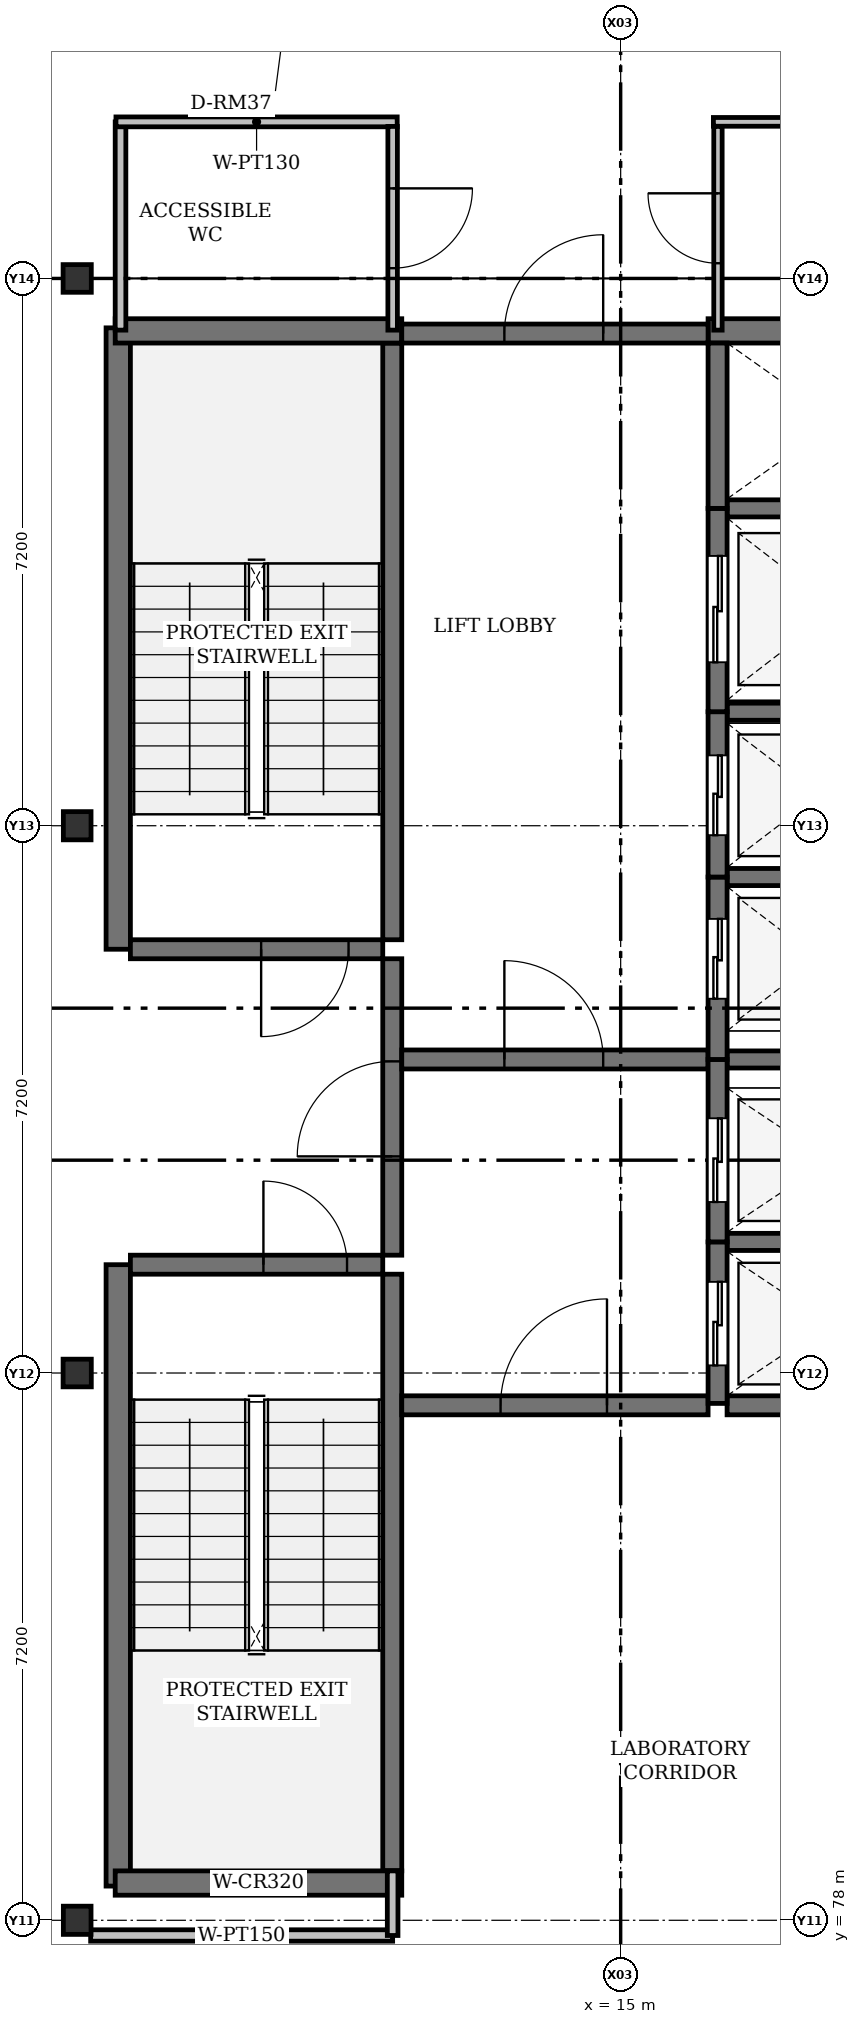
"""IFC4 building model, lengths in metres.
Left out: names, types, materials, properties, quantities, classifications, styles, units other than length and angle.
Written with IfcOpenShell. Run it as: python <this file> out.ifc"""

import sys

from ifc_helpers import new_model, si_unit, direction, frame, frame_2d, origin, origin_2d, place, context, subcontext, project, spatial, rectangle, i_section, extrude, element, fill, save


model = new_model("IFC4")
c1 = context("Model", 3, precision=1e-05, world=origin(), true_north=direction((0.0, 1.0)))
c2 = subcontext(c1, "Body", "Model", "MODEL_VIEW")
j1 = project(units=[si_unit("LENGTHUNIT", "METRE"), si_unit("PLANEANGLEUNIT", "RADIAN")], contexts=[c1])
p1 = place(None, origin())
s1 = spatial("IfcSite", under=j1, at=p1, CompositionType="ELEMENT")
p2 = place(p1, origin())
s2 = spatial("IfcBuilding", under=s1, at=p2, CompositionType="ELEMENT")
p3 = place(p2, frame((0.0, 0.0, 35.1)))
s3 = spatial("IfcBuildingStorey", under=s2, at=p3, CompositionType="ELEMENT", Elevation=35.1)
for number, where, z_axis, x_axis in (
    (1, (7.85, 78.0, 0.0), (0.0, 0.0, 1.0), (0.0, 1.0, 0.0)),
    (2, (7.85, 85.2, 0.0), (0.0, 0.0, 1.0), (1.0, 0.0, 0.0)),
    (3, (7.85, 92.4, 0.0), (0.0, 0.0, 1.0), (0.0, 1.0, 0.0)),
    (4, (7.85, 99.6, 0.0), (0.0, 0.0, 1.0), (1.0, 0.0, 0.0)),
):
    element("IfcColumn", number, at=place(p3, frame(where, z_axis=z_axis, x_axis=x_axis)), inside=s3, PredefinedType="COLUMN", context=c2, shape_type="SweptSolid", body=[
        extrude(i_section(OverallWidth=0.371, OverallDepth=0.364, WebThickness=0.013, FlangeThickness=0.022, FilletRadius=0.015, at=origin_2d()), origin(), (0.0, 0.0, 1.0), 4.2),
    ])
for number, where, z_axis, x_axis in (
    (5, (8.39, 78.45, 0.0), (0.0, 0.0, 1.0), (0.0, 1.0, 0.0)),
    (6, (8.39, 90.775, 0.0), (0.0, 0.0, 1.0), (0.0, 1.0, 0.0)),
):
    element("IfcWall", number, at=place(p3, frame(where, z_axis=z_axis, x_axis=x_axis)), inside=s3, PredefinedType="SHEAR", context=c2, shape_type="SweptSolid", body=[
        extrude(rectangle(XDim=8.175, YDim=0.32, at=frame_2d((4.087, 0.0))), origin(), (0.0, 0.0, 1.0), 4.2),
    ])
for number, where, z_axis, x_axis in (
    (7, (11.995, 78.65, 0.0), (0.0, 0.0, 1.0), (0.0, 1.0, 0.0)),
    (8, (11.995, 90.9, 0.0), (0.0, 0.0, 1.0), (0.0, 1.0, 0.0)),
):
    element("IfcWall", number, at=place(p3, frame(where, z_axis=z_axis, x_axis=x_axis)), inside=s3, PredefinedType="SHEAR", context=c2, shape_type="SweptSolid", body=[
        extrude(rectangle(XDim=7.85, YDim=0.25, at=frame_2d((3.925, 0.0))), origin(), (0.0, 0.0, 1.0), 4.2),
    ])
p4 = place(p3, frame((11.995, 86.75, 0.0), z_axis=(0.0, 0.0, 1.0), x_axis=(0.0, 1.0, 0.0)))
e9 = element("IfcWall", 9, at=p4, inside=s3, PredefinedType="SHEAR", context=c2, shape_type="SweptSolid", body=[
    extrude(rectangle(XDim=3.9, YDim=0.25, at=frame_2d((1.95, 0.0))), origin(), (0.0, 0.0, 1.0), 4.2),
])
p5 = place(p4, frame((1.3, 0.0, 0.0)))
e10 = element("IfcOpeningElement", 10, at=p5, cuts=e9, PredefinedType="OPENING", context=c2, shape_type="SweptSolid", body=[
    extrude(rectangle(XDim=1.25, YDim=2.2, at=frame_2d((0.625, 1.1))), frame((0.0, 0.125, 0.0), z_axis=(0.0, -1.0, 0.0), x_axis=(1.0, 0.0, 0.0)), (0.0, 0.0, 1.0), 0.25),
])
for number, where, z_axis, x_axis in (
    (11, (8.35, 78.49, 0.0), (0.0, 0.0, 1.0), (1.0, 0.0, 0.0)),
    (12, (8.35, 98.91, 0.0), (0.0, 0.0, 1.0), (1.0, 0.0, 0.0)),
):
    element("IfcWall", number, at=place(p3, frame(where, z_axis=z_axis, x_axis=x_axis)), inside=s3, PredefinedType="SHEAR", context=c2, shape_type="SweptSolid", body=[
        extrude(rectangle(XDim=3.77, YDim=0.32, at=frame_2d((1.885, 0.0))), origin(), (0.0, 0.0, 1.0), 4.2),
    ])
p6 = place(p3, frame((16.15, 98.91, 0.0), z_axis=(0.0, 0.0, 1.0), x_axis=(1.0, 0.0, 0.0)))
e13 = element("IfcWall", 13, at=p6, inside=s3, PredefinedType="SHEAR", context=c2, shape_type="SweptSolid", body=[
    extrude(rectangle(XDim=3.3, YDim=0.32, at=frame_2d((1.65, 0.0))), origin(), (0.0, 0.0, 1.0), 4.2),
])
p7 = place(p3, frame((12.12, 98.875, 0.0), z_axis=(0.0, 0.0, 1.0), x_axis=(1.0, 0.0, 0.0)))
e14 = element("IfcWall", 14, at=p7, inside=s3, PredefinedType="SHEAR", context=c2, shape_type="SweptSolid", body=[
    extrude(rectangle(XDim=4.03, YDim=0.25, at=frame_2d((2.015, 0.0))), origin(), (0.0, 0.0, 1.0), 4.2),
])
p8 = place(p7, frame((1.35, 0.0, 0.0)))
e15 = element("IfcOpeningElement", 15, at=p8, cuts=e14, PredefinedType="OPENING", context=c2, shape_type="SweptSolid", body=[
    extrude(rectangle(XDim=1.3, YDim=2.2, at=frame_2d((0.65, 1.1))), frame((0.0, 0.125, 0.0), z_axis=(0.0, -1.0, 0.0), x_axis=(1.0, 0.0, 0.0)), (0.0, 0.0, 1.0), 0.25),
])
p9 = place(p3, frame((8.55, 86.625, 0.0), z_axis=(0.0, 0.0, 1.0), x_axis=(1.0, 0.0, 0.0)))
e16 = element("IfcWall", 16, at=p9, inside=s3, PredefinedType="SHEAR", context=c2, shape_type="SweptSolid", body=[
    extrude(rectangle(XDim=3.32, YDim=0.25, at=frame_2d((1.66, 0.0))), origin(), (0.0, 0.0, 1.0), 4.2),
])
p10 = place(p9, frame((1.75, 0.0, 0.0)))
e17 = element("IfcOpeningElement", 17, at=p10, cuts=e16, PredefinedType="OPENING", context=c2, shape_type="SweptSolid", body=[
    extrude(rectangle(XDim=1.1, YDim=2.15, at=frame_2d((0.55, 1.075))), frame((0.0, 0.125, 0.0), z_axis=(0.0, -1.0, 0.0), x_axis=(1.0, 0.0, 0.0)), (0.0, 0.0, 1.0), 0.25),
])
p11 = place(p3, frame((11.87, 90.775, 0.0), z_axis=(0.0, 0.0, 1.0), x_axis=(-1.0, 0.0, 0.0)))
e18 = element("IfcWall", 18, at=p11, inside=s3, PredefinedType="SHEAR", context=c2, shape_type="SweptSolid", body=[
    extrude(rectangle(XDim=3.32, YDim=0.25, at=frame_2d((1.66, 0.0))), origin(), (0.0, 0.0, 1.0), 4.2),
])
p12 = place(p11, frame((0.45, 0.0, 0.0)))
e19 = element("IfcOpeningElement", 19, at=p12, cuts=e18, PredefinedType="OPENING", context=c2, shape_type="SweptSolid", body=[
    extrude(rectangle(XDim=1.15, YDim=2.15, at=frame_2d((0.575, 1.075))), frame((0.0, 0.125, 0.0), z_axis=(0.0, -1.0, 0.0), x_axis=(1.0, 0.0, 0.0)), (0.0, 0.0, 1.0), 0.25),
])
p13 = place(p3, frame((12.12, 89.325, 0.0), z_axis=(0.0, 0.0, 1.0), x_axis=(1.0, 0.0, 0.0)))
e20 = element("IfcWall", 20, at=p13, inside=s3, PredefinedType="SHEAR", context=c2, shape_type="SweptSolid", body=[
    extrude(rectangle(XDim=4.03, YDim=0.25, at=frame_2d((2.015, 0.0))), origin(), (0.0, 0.0, 1.0), 4.2),
])
p14 = place(p13, frame((1.35, 0.0, 0.0)))
e21 = element("IfcOpeningElement", 21, at=p14, cuts=e20, PredefinedType="OPENING", context=c2, shape_type="SweptSolid", body=[
    extrude(rectangle(XDim=1.3, YDim=2.2, at=frame_2d((0.65, 1.1))), frame((0.0, 0.125, 0.0), z_axis=(0.0, -1.0, 0.0), x_axis=(1.0, 0.0, 0.0)), (0.0, 0.0, 1.0), 0.25),
])
p15 = place(p3, frame((12.12, 84.775, 0.0), z_axis=(0.0, 0.0, 1.0), x_axis=(1.0, 0.0, 0.0)))
e22 = element("IfcWall", 22, at=p15, inside=s3, PredefinedType="SHEAR", context=c2, shape_type="SweptSolid", body=[
    extrude(rectangle(XDim=4.03, YDim=0.25, at=frame_2d((2.015, 0.0))), origin(), (0.0, 0.0, 1.0), 4.2),
])
p16 = place(p15, frame((1.3, 0.0, 0.0)))
e23 = element("IfcOpeningElement", 23, at=p16, cuts=e22, PredefinedType="OPENING", context=c2, shape_type="SweptSolid", body=[
    extrude(rectangle(XDim=1.4, YDim=2.25, at=frame_2d((0.7, 1.125))), frame((0.0, 0.125, 0.0), z_axis=(0.0, -1.0, 0.0), x_axis=(1.0, 0.0, 0.0)), (0.0, 0.0, 1.0), 0.25),
])
p17 = place(p3, frame((16.4, 84.775, 0.0), z_axis=(0.0, 0.0, 1.0), x_axis=(1.0, 0.0, 0.0)))
e24 = element("IfcWall", 24, at=p17, inside=s3, PredefinedType="SHEAR", context=c2, shape_type="SweptSolid", body=[
    extrude(rectangle(XDim=2.95, YDim=0.25, at=frame_2d((1.475, 0.0))), origin(), (0.0, 0.0, 1.0), 4.2),
])
for number, where, z_axis, x_axis in (
    (25, (16.4, 86.925, 0.0), (0.0, 0.0, 1.0), (1.0, 0.0, 0.0)),
    (26, (16.4, 89.325, 0.0), (0.0, 0.0, 1.0), (1.0, 0.0, 0.0)),
    (27, (16.4, 91.725, 0.0), (0.0, 0.0, 1.0), (1.0, 0.0, 0.0)),
    (28, (16.4, 93.9, 0.0), (0.0, 0.0, 1.0), (1.0, 0.0, 0.0)),
    (29, (16.4, 96.575, 0.0), (0.0, 0.0, 1.0), (1.0, 0.0, 0.0)),
):
    element("IfcWall", number, at=place(p3, frame(where, z_axis=z_axis, x_axis=x_axis)), inside=s3, PredefinedType="SHEAR", context=c2, shape_type="SweptSolid", body=[
        extrude(rectangle(XDim=2.8, YDim=0.225, at=frame_2d((1.4, 0.0))), origin(), (0.0, 0.0, 1.0), 4.2),
    ])
p18 = place(p3, frame((16.275, 84.8, 0.0), z_axis=(0.0, 0.0, 1.0), x_axis=(0.0, 1.0, 0.0)))
e30 = element("IfcWall", 30, at=p18, inside=s3, PredefinedType="SHEAR", context=c2, shape_type="SweptSolid", body=[
    extrude(rectangle(XDim=2.125, YDim=0.25, at=frame_2d((1.062, 0.0))), origin(), (0.0, 0.0, 1.0), 4.2),
])
p19 = place(p18, frame((0.5, 0.0, 0.0)))
e31 = element("IfcOpeningElement", 31, at=p19, cuts=e30, PredefinedType="OPENING", context=c2, shape_type="SweptSolid", body=[
    extrude(rectangle(XDim=1.1, YDim=2.15, at=frame_2d((0.55, 1.075))), frame((0.0, 0.125, 0.0), z_axis=(0.0, -1.0, 0.0), x_axis=(1.0, 0.0, 0.0)), (0.0, 0.0, 1.0), 0.25),
])
p20 = place(p3, frame((16.275, 86.925, 0.0), z_axis=(0.0, 0.0, 1.0), x_axis=(0.0, 1.0, 0.0)))
e32 = element("IfcWall", 32, at=p20, inside=s3, PredefinedType="SHEAR", context=c2, shape_type="SweptSolid", body=[
    extrude(rectangle(XDim=2.4, YDim=0.25, at=frame_2d((1.2, 0.0))), origin(), (0.0, 0.0, 1.0), 4.2),
])
p21 = place(p20, frame((0.525, 0.0, 0.0)))
e33 = element("IfcOpeningElement", 33, at=p21, cuts=e32, PredefinedType="OPENING", context=c2, shape_type="SweptSolid", body=[
    extrude(rectangle(XDim=1.1, YDim=2.15, at=frame_2d((0.55, 1.075))), frame((0.0, 0.125, 0.0), z_axis=(0.0, -1.0, 0.0), x_axis=(1.0, 0.0, 0.0)), (0.0, 0.0, 1.0), 0.25),
])
p22 = place(p3, frame((16.275, 89.325, 0.0), z_axis=(0.0, 0.0, 1.0), x_axis=(0.0, 1.0, 0.0)))
e34 = element("IfcWall", 34, at=p22, inside=s3, PredefinedType="SHEAR", context=c2, shape_type="SweptSolid", body=[
    extrude(rectangle(XDim=2.4, YDim=0.25, at=frame_2d((1.2, 0.0))), origin(), (0.0, 0.0, 1.0), 4.2),
])
p23 = place(p22, frame((0.8, 0.0, 0.0)))
e35 = element("IfcOpeningElement", 35, at=p23, cuts=e34, PredefinedType="OPENING", context=c2, shape_type="SweptSolid", body=[
    extrude(rectangle(XDim=1.05, YDim=2.15, at=frame_2d((0.525, 1.075))), frame((0.0, 0.125, 0.0), z_axis=(0.0, -1.0, 0.0), x_axis=(1.0, 0.0, 0.0)), (0.0, 0.0, 1.0), 0.25),
])
p24 = place(p3, frame((16.275, 91.725, 0.0), z_axis=(0.0, 0.0, 1.0), x_axis=(0.0, 1.0, 0.0)))
e36 = element("IfcWall", 36, at=p24, inside=s3, PredefinedType="SHEAR", context=c2, shape_type="SweptSolid", body=[
    extrude(rectangle(XDim=2.175, YDim=0.25, at=frame_2d((1.087, 0.0))), origin(), (0.0, 0.0, 1.0), 4.2),
])
p25 = place(p24, frame((0.55, 0.0, 0.0)))
e37 = element("IfcOpeningElement", 37, at=p25, cuts=e36, PredefinedType="OPENING", context=c2, shape_type="SweptSolid", body=[
    extrude(rectangle(XDim=1.05, YDim=2.15, at=frame_2d((0.525, 1.075))), frame((0.0, 0.125, 0.0), z_axis=(0.0, -1.0, 0.0), x_axis=(1.0, 0.0, 0.0)), (0.0, 0.0, 1.0), 0.25),
])
p26 = place(p3, frame((16.275, 93.9, 0.0), z_axis=(0.0, 0.0, 1.0), x_axis=(0.0, 1.0, 0.0)))
e38 = element("IfcWall", 38, at=p26, inside=s3, PredefinedType="SHEAR", context=c2, shape_type="SweptSolid", body=[
    extrude(rectangle(XDim=2.675, YDim=0.25, at=frame_2d((1.337, 0.0))), origin(), (0.0, 0.0, 1.0), 4.2),
])
p27 = place(p26, frame((0.65, 0.0, 0.0)))
e39 = element("IfcOpeningElement", 39, at=p27, cuts=e38, PredefinedType="OPENING", context=c2, shape_type="SweptSolid", body=[
    extrude(rectangle(XDim=1.4, YDim=2.25, at=frame_2d((0.7, 1.125))), frame((0.0, 0.125, 0.0), z_axis=(0.0, -1.0, 0.0), x_axis=(1.0, 0.0, 0.0)), (0.0, 0.0, 1.0), 0.25),
])
p28 = place(p3, frame((16.275, 96.575, 0.0), z_axis=(0.0, 0.0, 1.0), x_axis=(0.0, 1.0, 0.0)))
e40 = element("IfcWall", 40, at=p28, inside=s3, PredefinedType="SHEAR", context=c2, shape_type="SweptSolid", body=[
    extrude(rectangle(XDim=2.175, YDim=0.25, at=frame_2d((1.087, 0.0))), origin(), (0.0, 0.0, 1.0), 4.2),
])
p29 = place(p3, frame((8.42, 98.92, 0.0), z_axis=(0.0, 0.0, 1.0), x_axis=(0.0, 1.0, 0.0)))
e41 = element("IfcWall", 41, at=p29, inside=s3, PredefinedType="PARTITIONING", context=c2, shape_type="SweptSolid", body=[
    extrude(rectangle(XDim=2.74, YDim=0.14, at=frame_2d((1.37, 0.0))), origin(), (0.0, 0.0, 1.0), 3.451),
])
p30 = place(p3, frame((8.36, 101.66, 0.0), z_axis=(0.0, 0.0, 1.0), x_axis=(1.0, 0.0, 0.0)))
e42 = element("IfcWall", 42, at=p30, inside=s3, PredefinedType="PARTITIONING", context=c2, shape_type="SweptSolid", body=[
    extrude(rectangle(XDim=3.7, YDim=0.13, at=frame_2d((1.85, 0.0))), origin(), (0.0, 0.0, 1.0), 3.95),
])
p31 = place(p3, frame((12.0, 101.6, 0.0), z_axis=(0.0, 0.0, 1.0), x_axis=(0.0, -1.0, 0.0)))
e43 = element("IfcWall", 43, at=p31, inside=s3, PredefinedType="PARTITIONING", context=c2, shape_type="SweptSolid", body=[
    extrude(rectangle(XDim=2.68, YDim=0.125, at=frame_2d((1.34, 0.0))), origin(), (0.0, 0.0, 1.0), 3.451),
])
p32 = place(p31, frame((0.815, 0.0, 0.0)))
e44 = element("IfcOpeningElement", 44, at=p32, cuts=e43, PredefinedType="OPENING", context=c2, shape_type="SweptSolid", body=[
    extrude(rectangle(XDim=1.05, YDim=2.1, at=frame_2d((0.525, 1.05))), frame((0.0, 0.062, 0.0), z_axis=(0.0, -1.0, 0.0), x_axis=(1.0, 0.0, 0.0)), (0.0, 0.0, 1.0), 0.125),
])
p33 = place(p3, frame((19.38, 101.66, 0.0), z_axis=(0.0, 0.0, 1.0), x_axis=(-1.0, 0.0, 0.0)))
e45 = element("IfcWall", 45, at=p33, inside=s3, PredefinedType="PARTITIONING", context=c2, shape_type="SweptSolid", body=[
    extrude(rectangle(XDim=3.16, YDim=0.115, at=frame_2d((1.58, 0.0))), origin(), (0.0, 0.0, 1.0), 3.95),
])
p34 = place(p3, frame((16.28, 98.92, 0.0), z_axis=(0.0, 0.0, 1.0), x_axis=(0.0, 1.0, 0.0)))
e46 = element("IfcWall", 46, at=p34, inside=s3, PredefinedType="PARTITIONING", context=c2, shape_type="SweptSolid", body=[
    extrude(rectangle(XDim=2.68, YDim=0.11, at=frame_2d((1.34, 0.0))), origin(), (0.0, 0.0, 1.0), 3.451),
])
p35 = place(p34, frame((0.88, 0.0, 0.0)))
e47 = element("IfcOpeningElement", 47, at=p35, cuts=e46, PredefinedType="OPENING", context=c2, shape_type="SweptSolid", body=[
    extrude(rectangle(XDim=0.92, YDim=2.15, at=frame_2d((0.46, 1.075))), frame((0.0, 0.055, 0.0), z_axis=(0.0, -1.0, 0.0), x_axis=(1.0, 0.0, 0.0)), (0.0, 0.0, 1.0), 0.11),
])
p36 = place(p3, frame((8.027, 77.8, 0.0), z_axis=(0.0, 0.0, 1.0), x_axis=(1.0, 0.0, 0.0)))
e48 = element("IfcWall", 48, at=p36, inside=s3, PredefinedType="PARTITIONING", context=c2, shape_type="SweptSolid", body=[
    extrude(rectangle(XDim=3.973, YDim=0.15, at=frame_2d((1.986, 0.0))), origin(), (0.0, 0.0, 1.0), 3.451),
])
p37 = place(p3, frame((12.0, 77.8, 0.0), z_axis=(0.0, 0.0, 1.0), x_axis=(0.0, 1.0, 0.0)))
e49 = element("IfcWall", 49, at=p37, inside=s3, PredefinedType="PARTITIONING", context=c2, shape_type="SweptSolid", body=[
    extrude(rectangle(XDim=0.85, YDim=0.14, at=frame_2d((0.425, 0.0))), origin(), (0.0, 0.0, 1.0), 3.451),
])
p38 = place(p5, origin())
e50 = element("IfcDoor", 50, at=p38, inside=s3, OperationType="SINGLE_SWING_LEFT", PredefinedType="DOOR", context=c2, shape_type="SweptSolid", body=[
    extrude(rectangle(XDim=1.25, YDim=2.2, at=frame_2d((0.625, 1.1))), frame((0.0, 0.025, 0.0), z_axis=(0.0, -1.0, 0.0), x_axis=(1.0, 0.0, 0.0)), (0.0, 0.0, 1.0), 0.05),
])
fill(e10, e50)
p39 = place(p8, origin())
e51 = element("IfcDoor", 51, at=p39, inside=s3, OperationType="SINGLE_SWING_RIGHT", PredefinedType="DOOR", context=c2, shape_type="SweptSolid", body=[
    extrude(rectangle(XDim=1.3, YDim=2.2, at=frame_2d((0.65, 1.1))), frame((0.0, 0.025, 0.0), z_axis=(0.0, -1.0, 0.0), x_axis=(1.0, 0.0, 0.0)), (0.0, 0.0, 1.0), 0.05),
])
fill(e15, e51)
p40 = place(p10, origin())
e52 = element("IfcDoor", 52, at=p40, inside=s3, OperationType="SINGLE_SWING_LEFT", PredefinedType="DOOR", context=c2, shape_type="SweptSolid", body=[
    extrude(rectangle(XDim=1.1, YDim=2.15, at=frame_2d((0.55, 1.075))), frame((0.0, 0.025, 0.0), z_axis=(0.0, -1.0, 0.0), x_axis=(1.0, 0.0, 0.0)), (0.0, 0.0, 1.0), 0.05),
])
fill(e17, e52)
p41 = place(p12, origin())
e53 = element("IfcDoor", 53, at=p41, inside=s3, OperationType="SINGLE_SWING_RIGHT", PredefinedType="DOOR", context=c2, shape_type="SweptSolid", body=[
    extrude(rectangle(XDim=1.15, YDim=2.15, at=frame_2d((0.575, 1.075))), frame((0.0, 0.025, 0.0), z_axis=(0.0, -1.0, 0.0), x_axis=(1.0, 0.0, 0.0)), (0.0, 0.0, 1.0), 0.05),
])
fill(e19, e53)
p42 = place(p14, origin())
e54 = element("IfcDoor", 54, at=p42, inside=s3, OperationType="SINGLE_SWING_LEFT", PredefinedType="DOOR", context=c2, shape_type="SweptSolid", body=[
    extrude(rectangle(XDim=1.3, YDim=2.2, at=frame_2d((0.65, 1.1))), frame((0.0, 0.025, 0.0), z_axis=(0.0, -1.0, 0.0), x_axis=(1.0, 0.0, 0.0)), (0.0, 0.0, 1.0), 0.05),
])
fill(e21, e54)
p43 = place(p16, origin())
e55 = element("IfcDoor", 55, at=p43, inside=s3, OperationType="SINGLE_SWING_RIGHT", PredefinedType="DOOR", context=c2, shape_type="SweptSolid", body=[
    extrude(rectangle(XDim=1.4, YDim=2.25, at=frame_2d((0.7, 1.125))), frame((0.0, 0.025, 0.0), z_axis=(0.0, -1.0, 0.0), x_axis=(1.0, 0.0, 0.0)), (0.0, 0.0, 1.0), 0.05),
])
fill(e23, e55)
p44 = place(p19, origin())
e56 = element("IfcDoor", 56, at=p44, inside=s3, OperationType="SLIDING_TO_LEFT", PredefinedType="DOOR", context=c2, shape_type="SweptSolid", body=[
    extrude(rectangle(XDim=1.1, YDim=2.15, at=frame_2d((0.55, 1.075))), frame((0.0, 0.025, 0.0), z_axis=(0.0, -1.0, 0.0), x_axis=(1.0, 0.0, 0.0)), (0.0, 0.0, 1.0), 0.05),
])
fill(e31, e56)
p45 = place(p21, origin())
e57 = element("IfcDoor", 57, at=p45, inside=s3, OperationType="SLIDING_TO_LEFT", PredefinedType="DOOR", context=c2, shape_type="SweptSolid", body=[
    extrude(rectangle(XDim=1.1, YDim=2.15, at=frame_2d((0.55, 1.075))), frame((0.0, 0.025, 0.0), z_axis=(0.0, -1.0, 0.0), x_axis=(1.0, 0.0, 0.0)), (0.0, 0.0, 1.0), 0.05),
])
fill(e33, e57)
p46 = place(p23, origin())
e58 = element("IfcDoor", 58, at=p46, inside=s3, OperationType="SLIDING_TO_LEFT", PredefinedType="DOOR", context=c2, shape_type="SweptSolid", body=[
    extrude(rectangle(XDim=1.05, YDim=2.15, at=frame_2d((0.525, 1.075))), frame((0.0, 0.025, 0.0), z_axis=(0.0, -1.0, 0.0), x_axis=(1.0, 0.0, 0.0)), (0.0, 0.0, 1.0), 0.05),
])
fill(e35, e58)
p47 = place(p25, origin())
e59 = element("IfcDoor", 59, at=p47, inside=s3, OperationType="SLIDING_TO_LEFT", PredefinedType="DOOR", context=c2, shape_type="SweptSolid", body=[
    extrude(rectangle(XDim=1.05, YDim=2.15, at=frame_2d((0.525, 1.075))), frame((0.0, 0.025, 0.0), z_axis=(0.0, -1.0, 0.0), x_axis=(1.0, 0.0, 0.0)), (0.0, 0.0, 1.0), 0.05),
])
fill(e37, e59)
p48 = place(p27, origin())
e60 = element("IfcDoor", 60, at=p48, inside=s3, OperationType="SLIDING_TO_LEFT", PredefinedType="DOOR", context=c2, shape_type="SweptSolid", body=[
    extrude(rectangle(XDim=1.4, YDim=2.25, at=frame_2d((0.7, 1.125))), frame((0.0, 0.025, 0.0), z_axis=(0.0, -1.0, 0.0), x_axis=(1.0, 0.0, 0.0)), (0.0, 0.0, 1.0), 0.05),
])
fill(e39, e60)
p49 = place(p32, origin())
e61 = element("IfcDoor", 61, at=p49, inside=s3, OperationType="SINGLE_SWING_LEFT", PredefinedType="DOOR", context=c2, shape_type="SweptSolid", body=[
    extrude(rectangle(XDim=1.05, YDim=2.1, at=frame_2d((0.525, 1.05))), frame((0.0, 0.025, 0.0), z_axis=(0.0, -1.0, 0.0), x_axis=(1.0, 0.0, 0.0)), (0.0, 0.0, 1.0), 0.05),
])
fill(e44, e61)
p50 = place(p35, origin())
e62 = element("IfcDoor", 62, at=p50, inside=s3, OperationType="SINGLE_SWING_RIGHT", PredefinedType="DOOR", context=c2, shape_type="SweptSolid", body=[
    extrude(rectangle(XDim=0.92, YDim=2.15, at=frame_2d((0.46, 1.075))), frame((0.0, 0.025, 0.0), z_axis=(0.0, -1.0, 0.0), x_axis=(1.0, 0.0, 0.0)), (0.0, 0.0, 1.0), 0.05),
])
fill(e47, e62)
save(model, sys.argv[1])
